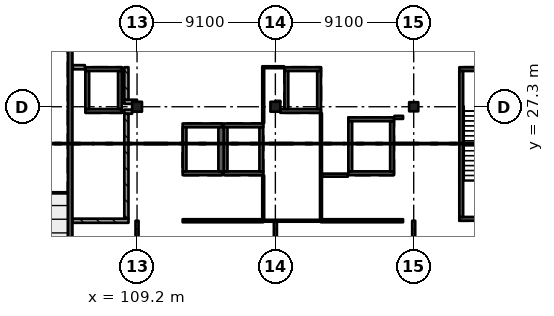
"""IFC4 building model, lengths in metres.
Left out: names, types, materials, properties, quantities, classifications, styles, units other than length and angle.
Written with IfcOpenShell. Run it as: python <this file> out.ifc"""

import sys

from ifc_helpers import new_model, si_unit, direction, frame, frame_2d, origin, origin_2d, place, context, subcontext, project, spatial, rectangle, extrude, element, fill, save


model = new_model("IFC4")
c1 = context("Model", 3, precision=1e-05, world=origin(), true_north=direction((0.0, 1.0)))
c2 = subcontext(c1, "Body", "Model", "MODEL_VIEW")
j1 = project(units=[si_unit("LENGTHUNIT", "METRE"), si_unit("PLANEANGLEUNIT", "RADIAN")], contexts=[c1])
p1 = place(None, origin())
s1 = spatial("IfcSite", under=j1, at=p1, CompositionType="ELEMENT")
p2 = place(p1, origin())
s2 = spatial("IfcBuilding", under=s1, at=p2, CompositionType="ELEMENT")
p3 = place(p2, frame((0.0, 0.0, 15.47)))
s3 = spatial("IfcBuildingStorey", under=s2, at=p3, CompositionType="ELEMENT", Elevation=15.47)
for number, where, z_axis, x_axis in (
    (1, (109.2, 27.3, 0.0), (0.0, 0.0, 1.0), (1.0, 0.0, 0.0)),
    (2, (118.3, 27.3, 0.0), (0.0, 0.0, 1.0), (1.0, 0.0, 0.0)),
):
    element("IfcColumn", number, at=place(p3, frame(where, z_axis=z_axis, x_axis=x_axis)), inside=s3, PredefinedType="COLUMN", context=c2, shape_type="SweptSolid", body=[
        extrude(rectangle(XDim=0.65, YDim=0.65, at=origin_2d()), origin(), (0.0, 0.0, 1.0), 4.55),
    ])
p4 = place(p3, frame((127.4, 27.3, 0.0), z_axis=(0.0, 0.0, 1.0), x_axis=(1.0, 0.0, 0.0)))
e3 = element("IfcColumn", 3, at=p4, inside=s3, PredefinedType="COLUMN", context=c2, shape_type="SweptSolid", body=[
    extrude(rectangle(XDim=0.6, YDim=0.6, at=origin_2d()), origin(), (0.0, 0.0, 1.0), 4.55),
])
p5 = place(p3, frame((104.8, 40.95, 0.0), z_axis=(0.0, 0.0, 1.0), x_axis=(0.0, -1.0, 0.0)))
e4 = element("IfcWall", 4, at=p5, inside=s3, PredefinedType="SHEAR", context=c2, shape_type="SweptSolid", body=[
    extrude(rectangle(XDim=22.75, YDim=0.3, at=frame_2d((11.375, 0.0))), origin(), (0.0, 0.0, 1.0), 4.55),
])
p6 = place(p3, frame((117.5, 22.925, 0.0), z_axis=(0.0, 0.0, 1.0), x_axis=(-1.0, 0.0, 0.0)))
e5 = element("IfcWall", 5, at=p6, inside=s3, PredefinedType="SHEAR", context=c2, shape_type="SweptSolid", body=[
    extrude(rectangle(XDim=2.6, YDim=0.25, at=frame_2d((1.3, 0.0))), origin(), (0.0, 0.0, 1.0), 4.55),
])
p7 = place(p6, frame((0.8, 0.0, 0.0)))
e6 = element("IfcOpeningElement", 6, at=p7, cuts=e5, PredefinedType="OPENING", context=c2, shape_type="SweptSolid", body=[
    extrude(rectangle(XDim=1.0, YDim=2.1, at=frame_2d((0.5, 1.05))), frame((0.0, 0.135, 0.0), z_axis=(0.0, -1.0, 0.0), x_axis=(1.0, 0.0, 0.0)), (0.0, 0.0, 1.0), 0.27),
])
p8 = place(p3, frame((117.5, 26.075, 0.0), z_axis=(0.0, 0.0, 1.0), x_axis=(-1.0, 0.0, 0.0)))
e7 = element("IfcWall", 7, at=p8, inside=s3, PredefinedType="SHEAR", context=c2, shape_type="SweptSolid", body=[
    extrude(rectangle(XDim=2.6, YDim=0.25, at=frame_2d((1.3, 0.0))), origin(), (0.0, 0.0, 1.0), 4.55),
])
for number, where, z_axis, x_axis in (
    (8, (115.025, 25.95, 0.0), (0.0, 0.0, 1.0), (0.0, -1.0, 0.0)),
    (9, (117.375, 25.95, 0.0), (0.0, 0.0, 1.0), (0.0, -1.0, 0.0)),
):
    element("IfcWall", number, at=place(p3, frame(where, z_axis=z_axis, x_axis=x_axis)), inside=s3, PredefinedType="SHEAR", context=c2, shape_type="SweptSolid", body=[
        extrude(rectangle(XDim=2.9, YDim=0.25, at=frame_2d((1.45, 0.0))), origin(), (0.0, 0.0, 1.0), 4.55),
    ])
p9 = place(p3, frame((114.8, 22.925, 0.0), z_axis=(0.0, 0.0, 1.0), x_axis=(-1.0, 0.0, 0.0)))
e10 = element("IfcWall", 10, at=p9, inside=s3, PredefinedType="SHEAR", context=c2, shape_type="SweptSolid", body=[
    extrude(rectangle(XDim=2.6, YDim=0.25, at=frame_2d((1.3, 0.0))), origin(), (0.0, 0.0, 1.0), 4.55),
])
p10 = place(p9, frame((0.8, 0.0, 0.0)))
e11 = element("IfcOpeningElement", 11, at=p10, cuts=e10, PredefinedType="OPENING", context=c2, shape_type="SweptSolid", body=[
    extrude(rectangle(XDim=1.0, YDim=2.1, at=frame_2d((0.5, 1.05))), frame((0.0, 0.135, 0.0), z_axis=(0.0, -1.0, 0.0), x_axis=(1.0, 0.0, 0.0)), (0.0, 0.0, 1.0), 0.27),
])
p11 = place(p3, frame((114.8, 26.075, 0.0), z_axis=(0.0, 0.0, 1.0), x_axis=(-1.0, 0.0, 0.0)))
e12 = element("IfcWall", 12, at=p11, inside=s3, PredefinedType="SHEAR", context=c2, shape_type="SweptSolid", body=[
    extrude(rectangle(XDim=2.6, YDim=0.25, at=frame_2d((1.3, 0.0))), origin(), (0.0, 0.0, 1.0), 4.55),
])
p12 = place(p3, frame((112.325, 25.95, 0.0), z_axis=(0.0, 0.0, 1.0), x_axis=(0.0, -1.0, 0.0)))
e13 = element("IfcWall", 13, at=p12, inside=s3, PredefinedType="SHEAR", context=c2, shape_type="SweptSolid", body=[
    extrude(rectangle(XDim=2.9, YDim=0.25, at=frame_2d((1.45, 0.0))), origin(), (0.0, 0.0, 1.0), 4.55),
])
p13 = place(p3, frame((114.725, 25.95, 0.0), z_axis=(0.0, 0.0, 1.0), x_axis=(0.0, -1.0, 0.0)))
e14 = element("IfcWall", 14, at=p13, inside=s3, PredefinedType="SHEAR", context=c2, shape_type="SweptSolid", body=[
    extrude(rectangle(XDim=2.9, YDim=0.35, at=frame_2d((1.45, 0.0))), origin(), (0.0, 0.0, 1.0), 4.55),
])
p14 = place(p3, frame((108.2, 27.025, 0.0), z_axis=(0.0, 0.0, 1.0), x_axis=(-1.0, 0.0, 0.0)))
e15 = element("IfcWall", 15, at=p14, inside=s3, PredefinedType="SHEAR", context=c2, shape_type="SweptSolid", body=[
    extrude(rectangle(XDim=2.4, YDim=0.25, at=frame_2d((1.2, 0.0))), origin(), (0.0, 0.0, 1.0), 4.55),
])
p15 = place(p14, frame((0.75, 0.0, 0.0)))
e16 = element("IfcOpeningElement", 16, at=p15, cuts=e15, PredefinedType="OPENING", context=c2, shape_type="SweptSolid", body=[
    extrude(rectangle(XDim=0.9, YDim=2.1, at=frame_2d((0.45, 1.05))), frame((0.0, 0.135, 0.0), z_axis=(0.0, -1.0, 0.0), x_axis=(1.0, 0.0, 0.0)), (0.0, 0.0, 1.0), 0.27),
])
p16 = place(p3, frame((108.2, 29.775, 0.0), z_axis=(0.0, 0.0, 1.0), x_axis=(-1.0, 0.0, 0.0)))
e17 = element("IfcWall", 17, at=p16, inside=s3, PredefinedType="SHEAR", context=c2, shape_type="SweptSolid", body=[
    extrude(rectangle(XDim=2.4, YDim=0.25, at=frame_2d((1.2, 0.0))), origin(), (0.0, 0.0, 1.0), 4.55),
])
for number, where, z_axis, x_axis in (
    (18, (105.925, 29.65, 0.0), (0.0, 0.0, 1.0), (0.0, -1.0, 0.0)),
    (19, (108.075, 29.65, 0.0), (0.0, 0.0, 1.0), (0.0, -1.0, 0.0)),
):
    element("IfcWall", number, at=place(p3, frame(where, z_axis=z_axis, x_axis=x_axis)), inside=s3, PredefinedType="SHEAR", context=c2, shape_type="SweptSolid", body=[
        extrude(rectangle(XDim=2.5, YDim=0.25, at=frame_2d((1.25, 0.0))), origin(), (0.0, 0.0, 1.0), 4.55),
    ])
p17 = place(p3, frame((121.3, 27.025, 0.0), z_axis=(0.0, 0.0, 1.0), x_axis=(-1.0, 0.0, 0.0)))
e20 = element("IfcWall", 20, at=p17, inside=s3, PredefinedType="SHEAR", context=c2, shape_type="SweptSolid", body=[
    extrude(rectangle(XDim=2.675, YDim=0.25, at=frame_2d((1.337, 0.0))), origin(), (0.0, 0.0, 1.0), 4.55),
])
p18 = place(p3, frame((121.3, 29.775, 0.0), z_axis=(0.0, 0.0, 1.0), x_axis=(-1.0, 0.0, 0.0)))
e21 = element("IfcWall", 21, at=p18, inside=s3, PredefinedType="SHEAR", context=c2, shape_type="SweptSolid", body=[
    extrude(rectangle(XDim=2.4, YDim=0.25, at=frame_2d((1.2, 0.0))), origin(), (0.0, 0.0, 1.0), 4.55),
])
p19 = place(p3, frame((119.025, 29.65, 0.0), z_axis=(0.0, 0.0, 1.0), x_axis=(0.0, -1.0, 0.0)))
e22 = element("IfcWall", 22, at=p19, inside=s3, PredefinedType="SHEAR", context=c2, shape_type="SweptSolid", body=[
    extrude(rectangle(XDim=2.5, YDim=0.25, at=frame_2d((1.25, 0.0))), origin(), (0.0, 0.0, 1.0), 4.55),
])
p20 = place(p3, frame((121.175, 29.65, 0.0), z_axis=(0.0, 0.0, 1.0), x_axis=(0.0, -1.0, 0.0)))
e23 = element("IfcWall", 23, at=p20, inside=s3, PredefinedType="SHEAR", context=c2, shape_type="SweptSolid", body=[
    extrude(rectangle(XDim=2.5, YDim=0.25, at=frame_2d((1.25, 0.0))), origin(), (0.0, 0.0, 1.0), 4.55),
])
p21 = place(p20, frame((0.9, 0.0, 0.0)))
e24 = element("IfcOpeningElement", 24, at=p21, cuts=e23, PredefinedType="OPENING", context=c2, shape_type="SweptSolid", body=[
    extrude(rectangle(XDim=0.7, YDim=2.1, at=frame_2d((0.35, 1.05))), frame((0.0, 0.135, 0.0), z_axis=(0.0, -1.0, 0.0), x_axis=(1.0, 0.0, 0.0)), (0.0, 0.0, 1.0), 0.27),
])
p22 = place(p3, frame((126.1, 22.925, 0.0), z_axis=(0.0, 0.0, 1.0), x_axis=(-1.0, 0.0, 0.0)))
e25 = element("IfcWall", 25, at=p22, inside=s3, PredefinedType="SHEAR", context=c2, shape_type="SweptSolid", body=[
    extrude(rectangle(XDim=3.0, YDim=0.25, at=frame_2d((1.5, 0.0))), origin(), (0.0, 0.0, 1.0), 4.55),
])
p23 = place(p22, frame((0.95, 0.0, 0.0)))
e26 = element("IfcOpeningElement", 26, at=p23, cuts=e25, PredefinedType="OPENING", context=c2, shape_type="SweptSolid", body=[
    extrude(rectangle(XDim=1.1, YDim=2.1, at=frame_2d((0.55, 1.05))), frame((0.0, 0.135, 0.0), z_axis=(0.0, -1.0, 0.0), x_axis=(1.0, 0.0, 0.0)), (0.0, 0.0, 1.0), 0.27),
])
p24 = place(p3, frame((126.1, 26.475, 0.0), z_axis=(0.0, 0.0, 1.0), x_axis=(-1.0, 0.0, 0.0)))
e27 = element("IfcWall", 27, at=p24, inside=s3, PredefinedType="SHEAR", context=c2, shape_type="SweptSolid", body=[
    extrude(rectangle(XDim=3.0, YDim=0.25, at=frame_2d((1.5, 0.0))), origin(), (0.0, 0.0, 1.0), 4.55),
])
for number, where, z_axis, x_axis in (
    (28, (123.225, 26.35, 0.0), (0.0, 0.0, 1.0), (0.0, -1.0, 0.0)),
    (29, (125.975, 26.35, 0.0), (0.0, 0.0, 1.0), (0.0, -1.0, 0.0)),
):
    element("IfcWall", number, at=place(p3, frame(where, z_axis=z_axis, x_axis=x_axis)), inside=s3, PredefinedType="SHEAR", context=c2, shape_type="SweptSolid", body=[
        extrude(rectangle(XDim=3.3, YDim=0.25, at=frame_2d((1.65, 0.0))), origin(), (0.0, 0.0, 1.0), 4.55),
    ])
p25 = place(p3, frame((135.8, 19.925, 0.0), z_axis=(0.0, 0.0, 1.0), x_axis=(-1.0, 0.0, 0.0)))
e30 = element("IfcWall", 30, at=p25, inside=s3, PredefinedType="SHEAR", context=c2, shape_type="SweptSolid", body=[
    extrude(rectangle(XDim=5.4, YDim=0.25, at=frame_2d((2.7, 0.0))), origin(), (0.0, 0.0, 1.0), 4.55),
])
p26 = place(p25, frame((1.5, 0.0, 0.0)))
e31 = element("IfcOpeningElement", 31, at=p26, cuts=e30, PredefinedType="OPENING", context=c2, shape_type="SweptSolid", body=[
    extrude(rectangle(XDim=2.4, YDim=2.1, at=frame_2d((1.2, 1.05))), frame((0.0, 0.135, 0.0), z_axis=(0.0, -1.0, 0.0), x_axis=(1.0, 0.0, 0.0)), (0.0, 0.0, 1.0), 0.27),
])
p27 = place(p3, frame((135.8, 29.775, 0.0), z_axis=(0.0, 0.0, 1.0), x_axis=(-1.0, 0.0, 0.0)))
e32 = element("IfcWall", 32, at=p27, inside=s3, PredefinedType="SHEAR", context=c2, shape_type="SweptSolid", body=[
    extrude(rectangle(XDim=5.4, YDim=0.25, at=frame_2d((2.7, 0.0))), origin(), (0.0, 0.0, 1.0), 4.55),
])
p28 = place(p3, frame((130.525, 29.65, 0.0), z_axis=(0.0, 0.0, 1.0), x_axis=(0.0, -1.0, 0.0)))
e33 = element("IfcWall", 33, at=p28, inside=s3, PredefinedType="SHEAR", context=c2, shape_type="SweptSolid", body=[
    extrude(rectangle(XDim=9.6, YDim=0.25, at=frame_2d((4.8, 0.0))), origin(), (0.0, 0.0, 1.0), 4.55),
])
p29 = place(p3, frame((104.95, 19.8, 0.0), z_axis=(0.0, 0.0, 1.0), x_axis=(1.0, 0.0, 0.0)))
e34 = element("IfcWall", 34, at=p29, inside=s3, PredefinedType="SOLIDWALL", context=c2, shape_type="SweptSolid", body=[
    extrude(rectangle(XDim=3.688, YDim=0.275, at=frame_2d((1.844, 0.0))), origin(), (0.0, 0.0, 1.0), 4.3),
])
p30 = place(p29, frame((1.25, 0.0, 0.0)))
e35 = element("IfcOpeningElement", 35, at=p30, cuts=e34, PredefinedType="OPENING", context=c2, shape_type="SweptSolid", body=[
    extrude(rectangle(XDim=1.2, YDim=2.4, at=frame_2d((0.6, 1.2))), frame((0.0, 0.147, 0.0), z_axis=(0.0, -1.0, 0.0), x_axis=(1.0, 0.0, 0.0)), (0.0, 0.0, 1.0), 0.295),
])
p31 = place(p3, frame((104.95, 29.9, 0.0), z_axis=(0.0, 0.0, 1.0), x_axis=(1.0, 0.0, 0.0)))
e36 = element("IfcWall", 36, at=p31, inside=s3, PredefinedType="SOLIDWALL", context=c2, shape_type="SweptSolid", body=[
    extrude(rectangle(XDim=0.82, YDim=0.275, at=frame_2d((0.41, 0.0))), origin(), (0.0, 0.0, 1.0), 4.3),
])
p32 = place(p3, frame((108.363, 26.975, 0.0), z_axis=(0.0, 0.0, 1.0), x_axis=(1.0, 0.0, 0.0)))
e37 = element("IfcWall", 37, at=p32, inside=s3, PredefinedType="SOLIDWALL", context=c2, shape_type="SweptSolid", body=[
    extrude(rectangle(XDim=0.512, YDim=0.275, at=frame_2d((0.256, 0.0))), origin(), (0.0, 0.0, 1.0), 4.3),
])
p33 = place(p3, frame((108.363, 27.625, 0.0), z_axis=(0.0, 0.0, 1.0), x_axis=(1.0, 0.0, 0.0)))
e38 = element("IfcWall", 38, at=p33, inside=s3, PredefinedType="SOLIDWALL", context=c2, shape_type="SweptSolid", body=[
    extrude(rectangle(XDim=0.837, YDim=0.275, at=frame_2d((0.419, 0.0))), origin(), (0.0, 0.0, 1.0), 4.3),
])
p34 = place(p3, frame((108.5, 19.938, 0.0), z_axis=(0.0, 0.0, 1.0), x_axis=(0.0, 1.0, 0.0)))
e39 = element("IfcWall", 39, at=p34, inside=s3, PredefinedType="SOLIDWALL", context=c2, shape_type="SweptSolid", body=[
    extrude(rectangle(XDim=6.9, YDim=0.275, at=frame_2d((3.45, 0.0))), origin(), (0.0, 0.0, 1.0), 4.3),
])
p35 = place(p3, frame((108.5, 27.762, 0.0), z_axis=(0.0, 0.0, 1.0), x_axis=(0.0, 1.0, 0.0)))
e40 = element("IfcWall", 40, at=p35, inside=s3, PredefinedType="SOLIDWALL", context=c2, shape_type="SweptSolid", body=[
    extrude(rectangle(XDim=2.137, YDim=0.275, at=frame_2d((1.069, 0.0))), origin(), (0.0, 0.0, 1.0), 4.3),
])
p36 = place(p3, frame((109.2, 18.55, 0.0), z_axis=(0.0, 0.0, 1.0), x_axis=(0.0, 1.0, 0.0)))
e41 = element("IfcWall", 41, at=p36, inside=s3, PredefinedType="PARTITIONING", context=c2, shape_type="SweptSolid", body=[
    extrude(rectangle(XDim=1.25, YDim=0.2, at=frame_2d((0.625, 0.0))), origin(), (0.0, 0.0, 1.0), 3.55),
])
p37 = place(p3, frame((112.2, 19.8, 0.0), z_axis=(0.0, 0.0, 1.0), x_axis=(1.0, 0.0, 0.0)))
e42 = element("IfcWall", 42, at=p37, inside=s3, PredefinedType="PARTITIONING", context=c2, shape_type="SweptSolid", body=[
    extrude(rectangle(XDim=5.3, YDim=0.2, at=frame_2d((2.65, 0.0))), origin(), (0.0, 0.0, 1.0), 4.3),
])
p38 = place(p37, frame((1.75, 0.0, 0.0)))
e43 = element("IfcOpeningElement", 43, at=p38, cuts=e42, PredefinedType="OPENING", context=c2, shape_type="SweptSolid", body=[
    extrude(rectangle(XDim=1.8, YDim=2.4, at=frame_2d((0.9, 1.2))), frame((0.0, 0.11, 0.0), z_axis=(0.0, -1.0, 0.0), x_axis=(1.0, 0.0, 0.0)), (0.0, 0.0, 1.0), 0.22),
])
p39 = place(p3, frame((117.438, 29.9, 0.0), z_axis=(0.0, 0.0, 1.0), x_axis=(1.0, 0.0, 0.0)))
e44 = element("IfcWall", 44, at=p39, inside=s3, PredefinedType="PARTITIONING", context=c2, shape_type="SweptSolid", body=[
    extrude(rectangle(XDim=1.433, YDim=0.125, at=frame_2d((0.716, 0.0))), origin(), (0.0, 0.0, 1.0), 4.3),
])
p40 = place(p3, frame((117.5, 19.8, 0.0), z_axis=(0.0, 0.0, 1.0), x_axis=(1.0, 0.0, 0.0)))
e45 = element("IfcWall", 45, at=p40, inside=s3, PredefinedType="PARTITIONING", context=c2, shape_type="SweptSolid", body=[
    extrude(rectangle(XDim=3.8, YDim=0.125, at=frame_2d((1.9, 0.0))), origin(), (0.0, 0.0, 1.0), 4.3),
])
p41 = place(p40, frame((1.85, 0.0, 0.0)))
e46 = element("IfcOpeningElement", 46, at=p41, cuts=e45, PredefinedType="OPENING", context=c2, shape_type="SweptSolid", body=[
    extrude(rectangle(XDim=0.9, YDim=2.1, at=frame_2d((0.45, 1.05))), frame((0.0, 0.073, 0.0), z_axis=(0.0, -1.0, 0.0), x_axis=(1.0, 0.0, 0.0)), (0.0, 0.0, 1.0), 0.145),
])
p42 = place(p3, frame((117.5, 19.9, 0.0), z_axis=(0.0, 0.0, 1.0), x_axis=(0.0, 1.0, 0.0)))
e47 = element("IfcWall", 47, at=p42, inside=s3, PredefinedType="PARTITIONING", context=c2, shape_type="SweptSolid", body=[
    extrude(rectangle(XDim=2.87, YDim=0.125, at=frame_2d((1.435, 0.0))), origin(), (0.0, 0.0, 1.0), 4.3),
])
p43 = place(p3, frame((117.5, 26.23, 0.0), z_axis=(0.0, 0.0, 1.0), x_axis=(0.0, 1.0, 0.0)))
e48 = element("IfcWall", 48, at=p43, inside=s3, PredefinedType="PARTITIONING", context=c2, shape_type="SweptSolid", body=[
    extrude(rectangle(XDim=3.607, YDim=0.125, at=frame_2d((1.804, 0.0))), origin(), (0.0, 0.0, 1.0), 4.3),
])
p44 = place(p3, frame((118.3, 18.55, 0.0), z_axis=(0.0, 0.0, 1.0), x_axis=(0.0, 1.0, 0.0)))
e49 = element("IfcWall", 49, at=p44, inside=s3, PredefinedType="PARTITIONING", context=c2, shape_type="SweptSolid", body=[
    extrude(rectangle(XDim=1.188, YDim=0.2, at=frame_2d((0.594, 0.0))), origin(), (0.0, 0.0, 1.0), 3.55),
])
p45 = place(p3, frame((118.625, 27.625, 0.0), z_axis=(0.0, 0.0, 1.0), x_axis=(-1.0, 0.0, 0.0)))
e50 = element("IfcWall", 50, at=p45, inside=s3, PredefinedType="PARTITIONING", context=c2, shape_type="SweptSolid", body=[
    extrude(rectangle(XDim=0.325, YDim=0.125, at=frame_2d((0.163, 0.0))), origin(), (0.0, 0.0, 1.0), 4.3),
])
p46 = place(p3, frame((121.3, 19.8, 0.0), z_axis=(0.0, 0.0, 1.0), x_axis=(1.0, 0.0, 0.0)))
e51 = element("IfcWall", 51, at=p46, inside=s3, PredefinedType="PARTITIONING", context=c2, shape_type="SweptSolid", body=[
    extrude(rectangle(XDim=5.4, YDim=0.2, at=frame_2d((2.7, 0.0))), origin(), (0.0, 0.0, 1.0), 4.3),
])
p47 = place(p46, frame((1.85, 0.0, 0.0)))
e52 = element("IfcOpeningElement", 52, at=p47, cuts=e51, PredefinedType="OPENING", context=c2, shape_type="SweptSolid", body=[
    extrude(rectangle(XDim=1.8, YDim=2.4, at=frame_2d((0.9, 1.2))), frame((0.0, 0.11, 0.0), z_axis=(0.0, -1.0, 0.0), x_axis=(1.0, 0.0, 0.0)), (0.0, 0.0, 1.0), 0.22),
])
p48 = place(p3, frame((121.3, 19.9, 0.0), z_axis=(0.0, 0.0, 1.0), x_axis=(0.0, 1.0, 0.0)))
e53 = element("IfcWall", 53, at=p48, inside=s3, PredefinedType="PARTITIONING", context=c2, shape_type="SweptSolid", body=[
    extrude(rectangle(XDim=6.97, YDim=0.125, at=frame_2d((3.485, 0.0))), origin(), (0.0, 0.0, 1.0), 4.3),
])
p49 = place(p3, frame((121.363, 22.8, 0.0), z_axis=(0.0, 0.0, 1.0), x_axis=(1.0, 0.0, 0.0)))
e54 = element("IfcWall", 54, at=p49, inside=s3, PredefinedType="PARTITIONING", context=c2, shape_type="SweptSolid", body=[
    extrude(rectangle(XDim=1.708, YDim=0.2, at=frame_2d((0.854, 0.0))), origin(), (0.0, 0.0, 1.0), 4.3),
])
p50 = place(p3, frame((126.13, 26.6, 0.0), z_axis=(0.0, 0.0, 1.0), x_axis=(1.0, 0.0, 0.0)))
e55 = element("IfcWall", 55, at=p50, inside=s3, PredefinedType="PARTITIONING", context=c2, shape_type="SweptSolid", body=[
    extrude(rectangle(XDim=0.57, YDim=0.2, at=frame_2d((0.285, 0.0))), origin(), (0.0, 0.0, 1.0), 4.3),
])
p51 = place(p3, frame((127.4, 18.55, 0.0), z_axis=(0.0, 0.0, 1.0), x_axis=(0.0, 1.0, 0.0)))
e56 = element("IfcWall", 56, at=p51, inside=s3, PredefinedType="PARTITIONING", context=c2, shape_type="SweptSolid", body=[
    extrude(rectangle(XDim=1.25, YDim=0.2, at=frame_2d((0.625, 0.0))), origin(), (0.0, 0.0, 1.0), 3.55),
])
p52 = place(p41, origin())
e57 = element("IfcDoor", 57, at=p52, inside=s3, OperationType="SINGLE_SWING_LEFT", PredefinedType="DOOR", context=c2, shape_type="SweptSolid", body=[
    extrude(rectangle(XDim=0.9, YDim=2.1, at=frame_2d((0.45, 1.05))), frame((0.0, 0.025, 0.0), z_axis=(0.0, -1.0, 0.0), x_axis=(1.0, 0.0, 0.0)), (0.0, 0.0, 1.0), 0.05),
])
fill(e46, e57)
p53 = place(p30, origin())
e58 = element("IfcDoor", 58, at=p53, inside=s3, OperationType="SINGLE_SWING_LEFT", PredefinedType="DOOR", context=c2, shape_type="SweptSolid", body=[
    extrude(rectangle(XDim=1.2, YDim=2.4, at=frame_2d((0.6, 1.2))), frame((0.0, 0.025, 0.0), z_axis=(0.0, -1.0, 0.0), x_axis=(1.0, 0.0, 0.0)), (0.0, 0.0, 1.0), 0.05),
])
fill(e35, e58)
p54 = place(p47, origin())
e59 = element("IfcDoor", 59, at=p54, inside=s3, OperationType="DOUBLE_DOOR_SINGLE_SWING", PredefinedType="DOOR", context=c2, shape_type="SweptSolid", body=[
    extrude(rectangle(XDim=1.8, YDim=2.4, at=frame_2d((0.9, 1.2))), frame((0.0, 0.025, 0.0), z_axis=(0.0, -1.0, 0.0), x_axis=(1.0, 0.0, 0.0)), (0.0, 0.0, 1.0), 0.05),
])
fill(e52, e59)
p55 = place(p38, origin())
e60 = element("IfcDoor", 60, at=p55, inside=s3, OperationType="DOUBLE_DOOR_SINGLE_SWING", PredefinedType="DOOR", context=c2, shape_type="SweptSolid", body=[
    extrude(rectangle(XDim=1.8, YDim=2.4, at=frame_2d((0.9, 1.2))), frame((0.0, 0.025, 0.0), z_axis=(0.0, -1.0, 0.0), x_axis=(1.0, 0.0, 0.0)), (0.0, 0.0, 1.0), 0.05),
])
fill(e43, e60)
p56 = place(p15, origin())
e61 = element("IfcDoor", 61, at=p56, inside=s3, OperationType="SINGLE_SWING_LEFT", PredefinedType="DOOR", context=c2, shape_type="SweptSolid", body=[
    extrude(rectangle(XDim=0.9, YDim=2.1, at=frame_2d((0.45, 1.05))), frame((0.0, 0.025, 0.0), z_axis=(0.0, -1.0, 0.0), x_axis=(1.0, 0.0, 0.0)), (0.0, 0.0, 1.0), 0.05),
])
fill(e16, e61)
p57 = place(p21, origin())
e62 = element("IfcDoor", 62, at=p57, inside=s3, OperationType="SINGLE_SWING_RIGHT", PredefinedType="DOOR", context=c2, shape_type="SweptSolid", body=[
    extrude(rectangle(XDim=0.7, YDim=2.1, at=frame_2d((0.35, 1.05))), frame((0.0, 0.025, 0.0), z_axis=(0.0, -1.0, 0.0), x_axis=(1.0, 0.0, 0.0)), (0.0, 0.0, 1.0), 0.05),
])
fill(e24, e62)
p58 = place(p7, origin())
e63 = element("IfcDoor", 63, at=p58, inside=s3, OperationType="DOUBLE_DOOR_SLIDING", PredefinedType="DOOR", context=c2, shape_type="SweptSolid", body=[
    extrude(rectangle(XDim=1.0, YDim=2.1, at=frame_2d((0.5, 1.05))), frame((0.0, 0.025, 0.0), z_axis=(0.0, -1.0, 0.0), x_axis=(1.0, 0.0, 0.0)), (0.0, 0.0, 1.0), 0.05),
])
fill(e6, e63)
p59 = place(p10, origin())
e64 = element("IfcDoor", 64, at=p59, inside=s3, OperationType="DOUBLE_DOOR_SLIDING", PredefinedType="DOOR", context=c2, shape_type="SweptSolid", body=[
    extrude(rectangle(XDim=1.0, YDim=2.1, at=frame_2d((0.5, 1.05))), frame((0.0, 0.025, 0.0), z_axis=(0.0, -1.0, 0.0), x_axis=(1.0, 0.0, 0.0)), (0.0, 0.0, 1.0), 0.05),
])
fill(e11, e64)
p60 = place(p23, origin())
e65 = element("IfcDoor", 65, at=p60, inside=s3, OperationType="DOUBLE_DOOR_SLIDING", PredefinedType="DOOR", context=c2, shape_type="SweptSolid", body=[
    extrude(rectangle(XDim=1.1, YDim=2.1, at=frame_2d((0.55, 1.05))), frame((0.0, 0.025, 0.0), z_axis=(0.0, -1.0, 0.0), x_axis=(1.0, 0.0, 0.0)), (0.0, 0.0, 1.0), 0.05),
])
fill(e26, e65)
save(model, sys.argv[1])
